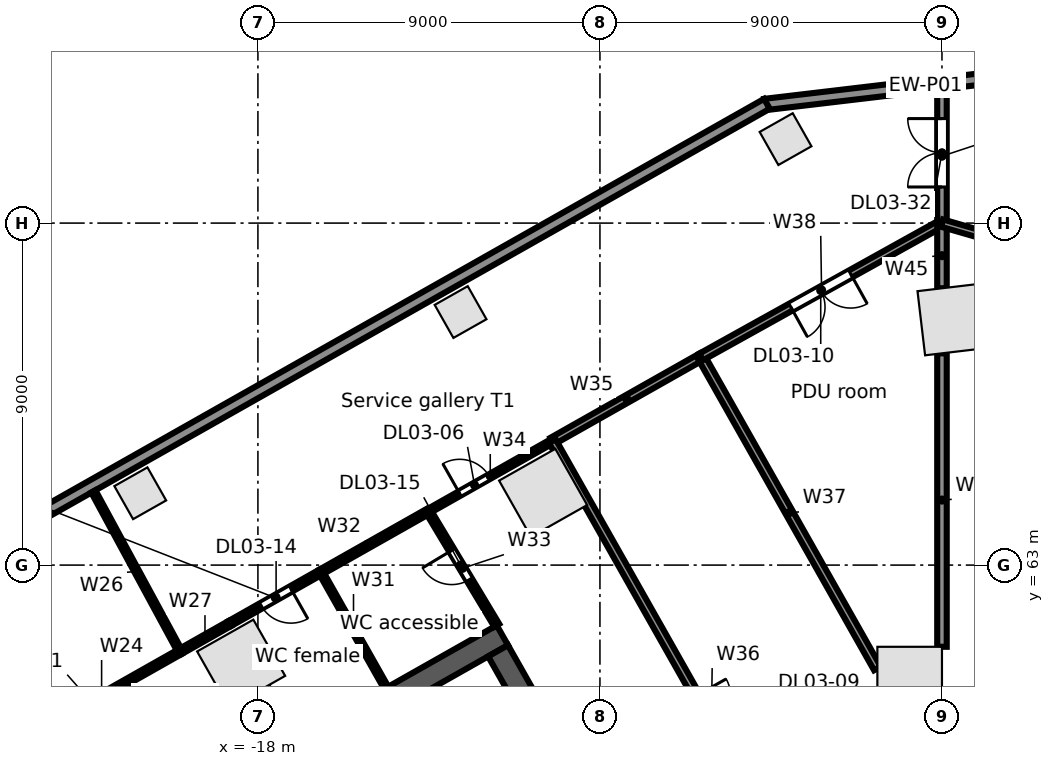
"""IFC4 building model, lengths in metres.
Left out: names, types, materials, properties, quantities, classifications, styles, units other than length and angle.
Written with IfcOpenShell. Run it as: python <this file> out.ifc"""

import sys

from ifc_helpers import new_model, si_unit, direction, frame, frame_2d, origin, origin_2d, place, context, subcontext, project, spatial, rectangle, extrude, element, fill, save


model = new_model("IFC4")
c1 = context("Model", 3, precision=1e-05, world=origin(), true_north=direction((0.0, 1.0)))
c2 = subcontext(c1, "Body", "Model", "MODEL_VIEW")
j1 = project(units=[si_unit("LENGTHUNIT", "METRE"), si_unit("PLANEANGLEUNIT", "RADIAN")], contexts=[c1])
p1 = place(None, origin())
s1 = spatial("IfcSite", under=j1, at=p1, CompositionType="ELEMENT")
p2 = place(p1, origin())
s2 = spatial("IfcBuilding", under=s1, at=p2, CompositionType="ELEMENT")
p3 = place(p2, frame((0.0, 0.0, 21.5)))
s3 = spatial("IfcBuildingStorey", under=s2, at=p3, CompositionType="ELEMENT", Elevation=21.5)
for number, where, z_axis, x_axis in (
    (1, (0.3, 69.464, 0.0), (0.0, 0.0, 1.0), (-0.993, -0.118, 0.0)),
    (2, (-10.495, 64.902, 0.0), (0.0, 0.0, 1.0), (-0.87, -0.492, 0.0)),
    (3, (-18.441, 60.406, 0.0), (0.0, 0.0, 1.0), (-0.87, -0.492, 0.0)),
    (4, (-0.85, 60.0, 0.0), (0.0, 0.0, 1.0), (0.0, 1.0, 0.0)),
):
    element("IfcColumn", number, at=place(p3, frame(where, z_axis=z_axis, x_axis=x_axis)), inside=s3, PredefinedType="COLUMN", context=c2, shape_type="SweptSolid", body=[
        extrude(rectangle(XDim=1.7, YDim=1.7, at=origin_2d()), origin(), (0.0, 0.0, 1.0), 5.0),
    ])
for number, where, z_axis, x_axis in (
    (5, (-4.116, 74.21, 0.0), (0.0, 0.0, 1.0), (-0.87, -0.492, 0.0)),
    (6, (-12.667, 69.659, 0.0), (0.0, 0.0, 1.0), (-0.87, -0.492, 0.0)),
    (7, (-21.096, 64.89, 0.0), (0.0, 0.0, 1.0), (-0.87, -0.492, 0.0)),
):
    element("IfcColumn", number, at=place(p3, frame(where, z_axis=z_axis, x_axis=x_axis)), inside=s3, PredefinedType="COLUMN", context=c2, shape_type="SweptSolid", body=[
        extrude(rectangle(XDim=1.0, YDim=1.0, at=origin_2d()), origin(), (0.0, 0.0, 1.0), 4.68),
    ])
p4 = place(p3, frame((-4.663, 75.12, 0.0), z_axis=(0.0, 0.0, 1.0), x_axis=(0.993070050845, 0.117523929966, 0.0)))
e8 = element("IfcWall", 8, at=p4, inside=s3, PredefinedType="STANDARD", context=c2, shape_type="SweptSolid", body=[
    extrude(rectangle(XDim=8.528, YDim=0.3, at=frame_2d((4.264, 0.0))), origin(), (0.0, 0.0, 1.0), 4.68),
])
p5 = place(p3, frame((-63.707, 41.701, 0.0), z_axis=(0.0, 0.0, 1.0), x_axis=(0.870355510268, 0.492423888277, 0.0)))
e9 = element("IfcWall", 9, at=p5, inside=s3, PredefinedType="STANDARD", context=c2, shape_type="SweptSolid", body=[
    extrude(rectangle(XDim=67.903, YDim=0.3, at=frame_2d((33.952, 0.0))), origin(), (0.0, 0.0, 1.0), 4.68),
])
p6 = place(p3, frame((-24.623, 53.767, 0.0), z_axis=(0.0, 0.0, 1.0), x_axis=(0.870356627484, 0.492421913601, 0.0)))
e10 = element("IfcWall", 10, at=p6, inside=s3, PredefinedType="SOLIDWALL", context=c2, shape_type="SweptSolid", body=[
    extrude(rectangle(XDim=15.0, YDim=0.6, at=frame_2d((7.5, 0.0))), origin(), (0.0, 0.0, 1.0), 4.68),
])
p7 = place(p3, frame((-11.681, 60.744, 0.0), z_axis=(0.0, 0.0, 1.0), x_axis=(0.492426772896, -0.870353878221, 0.0)))
e11 = element("IfcWall", 11, at=p7, inside=s3, PredefinedType="SOLIDWALL", context=c2, shape_type="SweptSolid", body=[
    extrude(rectangle(XDim=12.8, YDim=0.6, at=frame_2d((6.4, 0.0))), origin(), (0.0, 0.0, 1.0), 4.68),
])
p8 = place(p3, frame((-24.18, 58.384, 0.0), z_axis=(0.0, 0.0, 1.0), x_axis=(0.870360772617, 0.492414587, 0.0)))
e12 = element("IfcWall", 12, at=p8, inside=s3, PredefinedType="PARTITIONING", context=c2, shape_type="SweptSolid", body=[
    extrude(rectangle(XDim=4.75, YDim=0.15, at=frame_2d((2.375, 0.0))), origin(), (0.0, 0.0, 1.0), 4.68),
])
p9 = place(p8, frame((1.95, 0.0, 0.0)))
e13 = element("IfcOpeningElement", 13, at=p9, cuts=e12, PredefinedType="OPENING", context=c2, shape_type="SweptSolid", body=[
    extrude(rectangle(XDim=0.9, YDim=2.1, at=frame_2d((0.45, 1.05))), frame((0.0, 0.085, 0.0), z_axis=(0.0, -1.0, 0.0), x_axis=(1.0, 0.0, 0.0)), (0.0, 0.0, 1.0), 0.17),
])
p10 = place(p3, frame((-22.33, 64.939, 0.0), z_axis=(0.0, 0.0, 1.0), x_axis=(0.476360236723, -0.879250206067, 0.0)))
e14 = element("IfcWall", 14, at=p10, inside=s3, PredefinedType="PARTITIONING", context=c2, shape_type="SweptSolid", body=[
    extrude(rectangle(XDim=4.795, YDim=0.125, at=frame_2d((2.397, 0.0))), origin(), (0.0, 0.0, 1.0), 3.96),
])
p11 = place(p3, frame((-20.046, 60.723, 0.0), z_axis=(0.0, 0.0, 1.0), x_axis=(0.870308175411, 0.492507542899, 0.0)))
e15 = element("IfcWall", 15, at=p11, inside=s3, PredefinedType="PARTITIONING", context=c2, shape_type="SweptSolid", body=[
    extrude(rectangle(XDim=1.5, YDim=0.15, at=frame_2d((0.75, 0.0))), origin(), (0.0, 0.0, 1.0), 3.952),
])
p12 = place(p3, frame((-18.74, 61.462, 0.0), z_axis=(0.0, 0.0, 1.0), x_axis=(0.870430549821, 0.492291232848, 0.0)))
e16 = element("IfcWall", 16, at=p12, inside=s3, PredefinedType="PARTITIONING", context=c2, shape_type="SweptSolid", body=[
    extrude(rectangle(XDim=2.75, YDim=0.15, at=frame_2d((1.375, 0.0))), origin(), (0.0, 0.0, 1.0), 4.68),
])
p13 = place(p12, frame((0.95, 0.0, 0.0)))
e17 = element("IfcOpeningElement", 17, at=p13, cuts=e16, PredefinedType="OPENING", context=c2, shape_type="SweptSolid", body=[
    extrude(rectangle(XDim=0.9, YDim=2.1, at=frame_2d((0.45, 1.05))), frame((0.0, 0.085, 0.0), z_axis=(0.0, -1.0, 0.0), x_axis=(1.0, 0.0, 0.0)), (0.0, 0.0, 1.0), 0.17),
])
p14 = place(p3, frame((-17.797, 59.794, 0.0), z_axis=(0.0, 0.0, 1.0), x_axis=(0.492366981934, -0.870387703901, 0.0)))
e18 = element("IfcWall", 18, at=p14, inside=s3, PredefinedType="PARTITIONING", context=c2, shape_type="SweptSolid", body=[
    extrude(rectangle(XDim=1.584, YDim=0.125, at=frame_2d((0.792, 0.0))), origin(), (0.0, 0.0, 1.0), 4.68),
])
p15 = place(p3, frame((-16.346, 62.816, 0.0), z_axis=(0.0, 0.0, 1.0), x_axis=(0.492220429283, -0.870470590541, 0.0)))
e19 = element("IfcWall", 19, at=p15, inside=s3, PredefinedType="PARTITIONING", context=c2, shape_type="SweptSolid", body=[
    extrude(rectangle(XDim=3.5, YDim=0.125, at=frame_2d((1.75, 0.0))), origin(), (0.0, 0.0, 1.0), 3.96),
])
p16 = place(p3, frame((-16.346, 62.816, 0.0), z_axis=(0.0, 0.0, 1.0), x_axis=(0.870334637055, 0.492460779699, 0.0)))
e20 = element("IfcWall", 20, at=p16, inside=s3, PredefinedType="PARTITIONING", context=c2, shape_type="SweptSolid", body=[
    extrude(rectangle(XDim=3.249, YDim=0.15, at=frame_2d((1.625, 0.0))), origin(), (0.0, 0.0, 1.0), 4.68),
])
p17 = place(p3, frame((-13.518, 64.416, 0.0), z_axis=(0.0, 0.0, 1.0), x_axis=(0.514875058642, -0.857265229663, 0.0)))
e21 = element("IfcWall", 21, at=p17, inside=s3, PredefinedType="PARTITIONING", context=c2, shape_type="SweptSolid", body=[
    extrude(rectangle(XDim=3.502, YDim=0.15, at=frame_2d((1.751, 0.0))), origin(), (0.0, 0.0, 1.0), 3.96),
])
p18 = place(p17, frame((1.2, 0.0, 0.0)))
e22 = element("IfcOpeningElement", 22, at=p18, cuts=e21, PredefinedType="OPENING", context=c2, shape_type="SweptSolid", body=[
    extrude(rectangle(XDim=0.9, YDim=2.1, at=frame_2d((0.45, 1.05))), frame((0.0, 0.085, 0.0), z_axis=(0.0, -1.0, 0.0), x_axis=(1.0, 0.0, 0.0)), (0.0, 0.0, 1.0), 0.17),
])
p19 = place(p3, frame((-13.518, 64.416, 0.0), z_axis=(0.0, 0.0, 1.0), x_axis=(0.870338454914, 0.492454032268, 0.0)))
e23 = element("IfcWall", 23, at=p19, inside=s3, PredefinedType="PARTITIONING", context=c2, shape_type="SweptSolid", body=[
    extrude(rectangle(XDim=3.75, YDim=0.125, at=frame_2d((1.875, 0.0))), origin(), (0.0, 0.0, 1.0), 3.742),
])
p20 = place(p19, frame((0.95, 0.0, 0.0)))
e24 = element("IfcOpeningElement", 24, at=p20, cuts=e23, PredefinedType="OPENING", context=c2, shape_type="SweptSolid", body=[
    extrude(rectangle(XDim=0.9, YDim=2.1, at=frame_2d((0.45, 1.05))), frame((0.0, 0.073, 0.0), z_axis=(0.0, -1.0, 0.0), x_axis=(1.0, 0.0, 0.0)), (0.0, 0.0, 1.0), 0.145),
])
p21 = place(p3, frame((-10.254, 66.263, 0.0), z_axis=(0.0, 0.0, 1.0), x_axis=(0.870454697906, 0.492248533664, 0.0)))
e25 = element("IfcWall", 25, at=p21, inside=s3, PredefinedType="PARTITIONING", context=c2, shape_type="SweptSolid", body=[
    extrude(rectangle(XDim=4.5, YDim=0.2, at=frame_2d((2.25, 0.0))), origin(), (0.0, 0.0, 1.0), 4.68),
])
p22 = place(p3, frame((-10.254, 66.263, 0.0), z_axis=(0.0, 0.0, 1.0), x_axis=(0.492411664329, -0.870362426138, 0.0)))
e26 = element("IfcWall", 26, at=p22, inside=s3, PredefinedType="PARTITIONING", context=c2, shape_type="SweptSolid", body=[
    extrude(rectangle(XDim=17.0, YDim=0.2, at=frame_2d((8.5, 0.0))), origin(), (0.0, 0.0, 1.0), 3.742),
])
p23 = place(p22, frame((7.7, 0.0, 0.0)))
e27 = element("IfcOpeningElement", 27, at=p23, cuts=e26, PredefinedType="OPENING", context=c2, shape_type="SweptSolid", body=[
    extrude(rectangle(XDim=1.8, YDim=2.1, at=frame_2d((0.9, 1.05))), frame((0.0, 0.11, 0.0), z_axis=(0.0, -1.0, 0.0), x_axis=(1.0, 0.0, 0.0)), (0.0, 0.0, 1.0), 0.22),
])
p24 = place(p3, frame((-6.337, 68.478, 0.0), z_axis=(0.0, 0.0, 1.0), x_axis=(0.492412602502, -0.870361895361, 0.0)))
e28 = element("IfcWall", 28, at=p24, inside=s3, PredefinedType="PARTITIONING", context=c2, shape_type="SweptSolid", body=[
    extrude(rectangle(XDim=9.417, YDim=0.2, at=frame_2d((4.708, 0.0))), origin(), (0.0, 0.0, 1.0), 3.742),
])
p25 = place(p3, frame((-6.337, 68.478, 0.0), z_axis=(0.0, 0.0, 1.0), x_axis=(0.87407148623, 0.485797320864, 0.0)))
e29 = element("IfcWall", 29, at=p25, inside=s3, PredefinedType="PARTITIONING", context=c2, shape_type="SweptSolid", body=[
    extrude(rectangle(XDim=7.25, YDim=0.2, at=frame_2d((3.625, 0.0))), origin(), (0.0, 0.0, 1.0), 3.96),
])
p26 = place(p25, frame((2.7, 0.0, 0.0)))
e30 = element("IfcOpeningElement", 30, at=p26, cuts=e29, PredefinedType="OPENING", context=c2, shape_type="SweptSolid", body=[
    extrude(rectangle(XDim=1.8, YDim=2.1, at=frame_2d((0.9, 1.05))), frame((0.0, 0.11, 0.0), z_axis=(0.0, -1.0, 0.0), x_axis=(1.0, 0.0, 0.0)), (0.0, 0.0, 1.0), 0.22),
])
p27 = place(p3, frame((0.0, 60.85, 0.0), z_axis=(0.0, 0.0, 1.0), x_axis=(0.0, 1.0, 0.0)))
e31 = element("IfcWall", 31, at=p27, inside=s3, PredefinedType="PARTITIONING", context=c2, shape_type="SweptSolid", body=[
    extrude(rectangle(XDim=7.723, YDim=0.25, at=frame_2d((3.861, 0.0))), origin(), (0.0, 0.0, 1.0), 3.952),
])
p28 = place(p3, frame((0.0, 70.285, 0.0), z_axis=(0.0, 0.0, 1.0), x_axis=(0.0, 1.0, 0.0)))
e32 = element("IfcWall", 32, at=p28, inside=s3, PredefinedType="PARTITIONING", context=c2, shape_type="SweptSolid", body=[
    extrude(rectangle(XDim=1.715, YDim=0.25, at=frame_2d((0.857, 0.0))), origin(), (0.0, 0.0, 1.0), 4.68),
])
p29 = place(p3, frame((0.0, 72.0, 0.0), z_axis=(0.0, 0.0, 1.0), x_axis=(0.0, 1.0, 0.0)))
e33 = element("IfcWall", 33, at=p29, inside=s3, PredefinedType="PARTITIONING", context=c2, shape_type="SweptSolid", body=[
    extrude(rectangle(XDim=3.521, YDim=0.25, at=frame_2d((1.76, 0.0))), origin(), (0.0, 0.0, 1.0), 3.96),
])
p30 = place(p29, frame((0.95, 0.0, 0.0)))
e34 = element("IfcOpeningElement", 34, at=p30, cuts=e33, PredefinedType="OPENING", context=c2, shape_type="SweptSolid", body=[
    extrude(rectangle(XDim=1.8, YDim=2.1, at=frame_2d((0.9, 1.05))), frame((0.0, 0.135, 0.0), z_axis=(0.0, -1.0, 0.0), x_axis=(1.0, 0.0, 0.0)), (0.0, 0.0, 1.0), 0.27),
])
p31 = place(p3, frame((0.0, 72.0, 0.0), z_axis=(0.0, 0.0, 1.0), x_axis=(0.960375968852, -0.278707729443, 0.0)))
e35 = element("IfcWall", 35, at=p31, inside=s3, PredefinedType="PARTITIONING", context=c2, shape_type="SweptSolid", body=[
    extrude(rectangle(XDim=11.058, YDim=0.2, at=frame_2d((5.529, 0.0))), origin(), (0.0, 0.0, 1.0), 3.742),
])
p32 = place(p31, frame((4.7, 0.0, 0.0)))
e36 = element("IfcOpeningElement", 36, at=p32, cuts=e35, PredefinedType="OPENING", context=c2, shape_type="SweptSolid", body=[
    extrude(rectangle(XDim=1.8, YDim=2.1, at=frame_2d((0.9, 1.05))), frame((0.0, 0.11, 0.0), z_axis=(0.0, -1.0, 0.0), x_axis=(1.0, 0.0, 0.0)), (0.0, 0.0, 1.0), 0.22),
])
p33 = place(p20, origin())
e37 = element("IfcDoor", 37, at=p33, inside=s3, OperationType="SINGLE_SWING_LEFT", PredefinedType="DOOR", context=c2, shape_type="SweptSolid", body=[
    extrude(rectangle(XDim=0.9, YDim=2.1, at=frame_2d((0.45, 1.05))), frame((0.0, 0.025, 0.0), z_axis=(0.0, -1.0, 0.0), x_axis=(1.0, 0.0, 0.0)), (0.0, 0.0, 1.0), 0.05),
])
fill(e24, e37)
p34 = place(p26, frame((1.8, 0.0, 0.0), z_axis=(0.0, 0.0, 1.0), x_axis=(-1.0, 0.0, 0.0)))
e38 = element("IfcDoor", 38, at=p34, inside=s3, OperationType="DOUBLE_DOOR_SINGLE_SWING", PredefinedType="DOOR", context=c2, shape_type="SweptSolid", body=[
    extrude(rectangle(XDim=1.8, YDim=2.1, at=frame_2d((0.9, 1.05))), frame((0.0, 0.025, 0.0), z_axis=(0.0, -1.0, 0.0), x_axis=(1.0, 0.0, 0.0)), (0.0, 0.0, 1.0), 0.05),
])
fill(e30, e38)
p35 = place(p13, frame((0.9, 0.0, 0.0), z_axis=(0.0, 0.0, 1.0), x_axis=(-1.0, 0.0, 0.0)))
e39 = element("IfcDoor", 39, at=p35, inside=s3, OperationType="SINGLE_SWING_LEFT", PredefinedType="DOOR", context=c2, shape_type="SweptSolid", body=[
    extrude(rectangle(XDim=0.9, YDim=2.1, at=frame_2d((0.45, 1.05))), frame((0.0, 0.025, 0.0), z_axis=(0.0, -1.0, 0.0), x_axis=(1.0, 0.0, 0.0)), (0.0, 0.0, 1.0), 0.05),
])
fill(e17, e39)
p36 = place(p18, frame((0.9, 0.0, 0.0), z_axis=(0.0, 0.0, 1.0), x_axis=(-1.0, 0.0, 0.0)))
e40 = element("IfcDoor", 40, at=p36, inside=s3, OperationType="SINGLE_SWING_RIGHT", PredefinedType="DOOR", context=c2, shape_type="SweptSolid", body=[
    extrude(rectangle(XDim=0.9, YDim=2.1, at=frame_2d((0.45, 1.05))), frame((0.0, 0.025, 0.0), z_axis=(0.0, -1.0, 0.0), x_axis=(1.0, 0.0, 0.0)), (0.0, 0.0, 1.0), 0.05),
])
fill(e22, e40)
p37 = place(p30, origin())
e41 = element("IfcDoor", 41, at=p37, inside=s3, OperationType="DOUBLE_DOOR_SINGLE_SWING", PredefinedType="DOOR", context=c2, shape_type="SweptSolid", body=[
    extrude(rectangle(XDim=1.8, YDim=2.1, at=frame_2d((0.9, 1.05))), frame((0.0, 0.025, 0.0), z_axis=(0.0, -1.0, 0.0), x_axis=(1.0, 0.0, 0.0)), (0.0, 0.0, 1.0), 0.05),
])
fill(e34, e41)
save(model, sys.argv[1])
